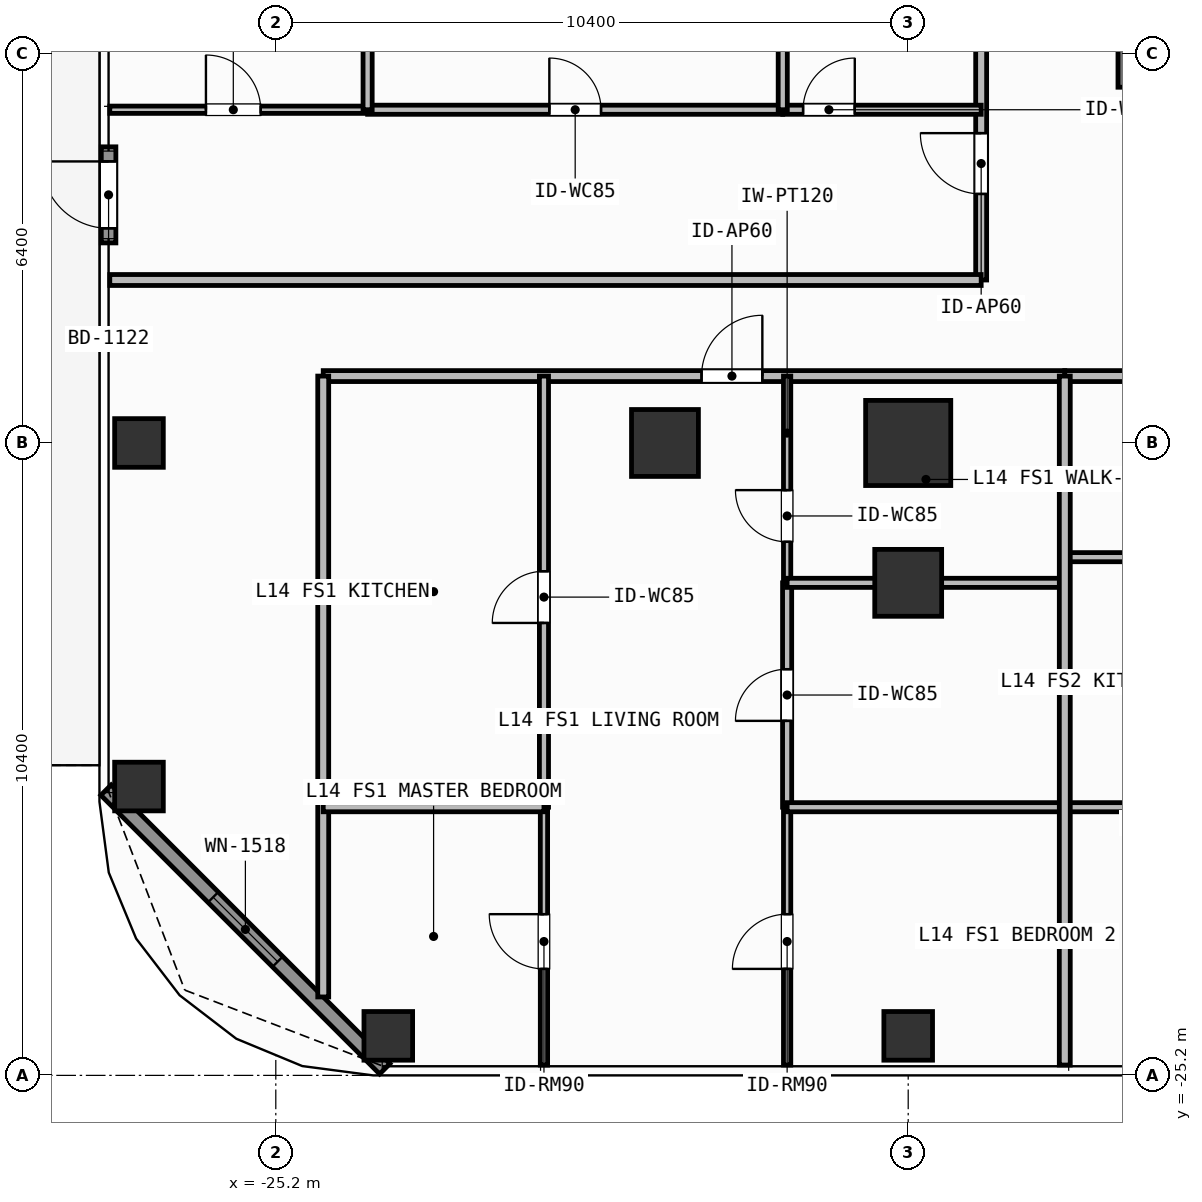
"""IFC4 building model, lengths in metres.
Left out: names, types, materials, properties, quantities, classifications, styles, units other than length and angle.
Written with IfcOpenShell. Run it as: python <this file> out.ifc"""

import sys

from ifc_helpers import new_model, si_unit, direction, frame, frame_2d, origin, origin_2d, place, context, subcontext, project, spatial, rectangle, hollow_rectangle, extrude, element, fill, save


model = new_model("IFC4")
c1 = context("Model", 3, precision=1e-05, world=origin(), true_north=direction((0.0, 1.0)))
c2 = subcontext(c1, "Body", "Model", "MODEL_VIEW")
j1 = project(units=[si_unit("LENGTHUNIT", "METRE"), si_unit("PLANEANGLEUNIT", "RADIAN")], contexts=[c1])
p1 = place(None, origin())
s1 = spatial("IfcSite", under=j1, at=p1, CompositionType="ELEMENT")
p2 = place(p1, origin())
s2 = spatial("IfcBuilding", under=s1, at=p2, CompositionType="ELEMENT")
p3 = place(p2, frame((0.0, 0.0, 54.0)))
s3 = spatial("IfcBuildingStorey", under=s2, at=p3, CompositionType="ELEMENT", Elevation=54.0)
p4 = place(p3, frame((-11.35, -8.4, 0.0), z_axis=(0.0, 0.0, 1.0), x_axis=(1.0, 0.0, 0.0)))
e1 = element("IfcWall", 1, at=p4, inside=s3, PredefinedType="SHEAR", context=c2, shape_type="SweptSolid", body=[
    extrude(rectangle(XDim=1.65, YDim=1.1, at=frame_2d((0.825, 0.0))), origin(), (0.0, 0.0, 1.0), 3.9),
])
p5 = place(p3, frame((-14.8, -14.8, 0.0), z_axis=(0.0, 0.0, 1.0), x_axis=(1.0, 0.0, 0.0)))
e2 = element("IfcColumn", 2, at=p5, inside=s3, PredefinedType="COLUMN", context=c2, shape_type="SweptSolid", body=[
    extrude(rectangle(XDim=1.4, YDim=1.4, at=origin_2d()), origin(), (0.0, 0.0, 1.0), 3.9),
])
for number, where, z_axis, x_axis in (
    (3, (-18.8, -14.8, 0.0), (0.0, 0.0, 1.0), (1.0, 0.0, 0.0)),
    (4, (-14.8, -17.1, 0.0), (0.0, 0.0, 1.0), (1.0, 0.0, 0.0)),
):
    element("IfcColumn", number, at=place(p3, frame(where, z_axis=z_axis, x_axis=x_axis)), inside=s3, PredefinedType="COLUMN", context=c2, shape_type="SweptSolid", body=[
        extrude(rectangle(XDim=1.1, YDim=1.1, at=origin_2d()), origin(), (0.0, 0.0, 1.0), 3.9),
    ])
for number, where, z_axis, x_axis in (
    (5, (-23.35, -24.55, 0.0), (0.0, 0.0, 1.0), (1.0, 0.0, 0.0)),
    (6, (-27.45, -20.45, 0.0), (0.0, 0.0, 1.0), (1.0, 0.0, 0.0)),
    (7, (-14.8, -24.55, 0.0), (0.0, 0.0, 1.0), (1.0, 0.0, 0.0)),
    (8, (-27.45, -14.8, 0.0), (0.0, 0.0, 1.0), (1.0, 0.0, 0.0)),
):
    element("IfcColumn", number, at=place(p3, frame(where, z_axis=z_axis, x_axis=x_axis)), inside=s3, PredefinedType="COLUMN", context=c2, shape_type="SweptSolid", body=[
        extrude(hollow_rectangle(XDim=0.8, YDim=0.8, WallThickness=0.036, at=origin_2d()), origin(), (0.0, 0.0, 1.0), 3.9),
    ])
p6 = place(p3, frame((-27.95, -11.51, 0.0), z_axis=(0.0, 0.0, 1.0), x_axis=(0.0, 1.0, 0.0)))
e9 = element("IfcWall", 9, at=p6, inside=s3, PredefinedType="SOLIDWALL", context=c2, shape_type="SweptSolid", body=[
    extrude(rectangle(XDim=1.58, YDim=0.24, at=frame_2d((0.79, 0.0))), origin(), (0.0, 0.0, 1.0), 3.68),
])
p7 = place(p6, frame((0.24, 0.0, 0.0)))
e10 = element("IfcOpeningElement", 10, at=p7, cuts=e9, PredefinedType="OPENING", context=c2, shape_type="SweptSolid", body=[
    extrude(rectangle(XDim=1.1, YDim=2.2, at=frame_2d((0.55, 1.1))), frame((0.0, 0.13, 0.0), z_axis=(0.0, -1.0, 0.0), x_axis=(1.0, 0.0, 0.0)), (0.0, 0.0, 1.0), 0.26),
])
p8 = place(p3, frame((-23.408, -25.092, 0.0), z_axis=(0.0, 0.0, 1.0), x_axis=(-0.707106781187, 0.707106781187, 0.0)))
e11 = element("IfcWall", 11, at=p8, inside=s3, PredefinedType="SOLIDWALL", context=c2, shape_type="SweptSolid", body=[
    extrude(rectangle(XDim=6.484, YDim=0.24, at=frame_2d((3.242, 0.0))), origin(), (0.0, 0.0, 1.0), 3.68),
])
p9 = place(p8, frame((2.492, 0.0, 0.8)))
e12 = element("IfcOpeningElement", 12, at=p9, cuts=e11, PredefinedType="OPENING", context=c2, shape_type="SweptSolid", body=[
    extrude(rectangle(XDim=1.5, YDim=1.85, at=frame_2d((0.75, 0.925))), frame((0.0, 0.13, 0.0), z_axis=(0.0, -1.0, 0.0), x_axis=(1.0, 0.0, 0.0)), (0.0, 0.0, 1.0), 0.26),
])
p10 = place(p3, frame((-24.42, -13.7, 0.0), z_axis=(0.0, 0.0, 1.0), x_axis=(1.0, 0.0, 0.0)))
e13 = element("IfcWall", 13, at=p10, inside=s3, PredefinedType="PARTITIONING", context=c2, shape_type="SweptSolid", body=[
    extrude(rectangle(XDim=12.195, YDim=0.18, at=frame_2d((6.097, 0.0))), origin(), (0.0, 0.0, 1.0), 3.68),
])
p11 = place(p10, frame((6.221, 0.0, 0.0)))
e14 = element("IfcOpeningElement", 14, at=p11, cuts=e13, PredefinedType="OPENING", context=c2, shape_type="SweptSolid", body=[
    extrude(rectangle(XDim=1.0, YDim=2.2, at=frame_2d((0.5, 1.1))), frame((0.0, 0.1, 0.0), z_axis=(0.0, -1.0, 0.0), x_axis=(1.0, 0.0, 0.0)), (0.0, 0.0, 1.0), 0.2),
])
p12 = place(p3, frame((-20.79, -20.79, 0.0), z_axis=(0.0, 0.0, 1.0), x_axis=(0.0, 1.0, 0.0)))
e15 = element("IfcWall", 15, at=p12, inside=s3, PredefinedType="PARTITIONING", context=c2, shape_type="SweptSolid", body=[
    extrude(rectangle(XDim=7.09, YDim=0.15, at=frame_2d((3.545, 0.0))), origin(), (0.0, 0.0, 1.0), 3.68),
])
p13 = place(p12, frame((3.03, 0.0, 0.0)))
e16 = element("IfcOpeningElement", 16, at=p13, cuts=e15, PredefinedType="OPENING", context=c2, shape_type="SweptSolid", body=[
    extrude(rectangle(XDim=0.85, YDim=2.1, at=frame_2d((0.425, 1.05))), frame((0.0, 0.085, 0.0), z_axis=(0.0, -1.0, 0.0), x_axis=(1.0, 0.0, 0.0)), (0.0, 0.0, 1.0), 0.17),
])
p14 = place(p3, frame((-20.79, -25.03, 0.0), z_axis=(0.0, 0.0, 1.0), x_axis=(0.0, 1.0, 0.0)))
e17 = element("IfcWall", 17, at=p14, inside=s3, PredefinedType="PARTITIONING", context=c2, shape_type="SweptSolid", body=[
    extrude(rectangle(XDim=4.24, YDim=0.12, at=frame_2d((2.12, 0.0))), origin(), (0.0, 0.0, 1.0), 3.68),
])
p15 = place(p14, frame((1.581, 0.0, 0.0)))
e18 = element("IfcOpeningElement", 18, at=p15, cuts=e17, PredefinedType="OPENING", context=c2, shape_type="SweptSolid", body=[
    extrude(rectangle(XDim=0.9, YDim=2.1, at=frame_2d((0.45, 1.05))), frame((0.0, 0.07, 0.0), z_axis=(0.0, -1.0, 0.0), x_axis=(1.0, 0.0, 0.0)), (0.0, 0.0, 1.0), 0.14),
])
p16 = place(p3, frame((-16.791, -20.79, 0.0), z_axis=(0.0, 0.0, 1.0), x_axis=(0.0, 1.0, 0.0)))
e19 = element("IfcWall", 19, at=p16, inside=s3, PredefinedType="PARTITIONING", context=c2, shape_type="SweptSolid", body=[
    extrude(rectangle(XDim=3.69, YDim=0.15, at=frame_2d((1.845, 0.0))), origin(), (0.0, 0.0, 1.0), 3.68),
])
p17 = place(p16, frame((1.42, 0.0, 0.0)))
e20 = element("IfcOpeningElement", 20, at=p17, cuts=e19, PredefinedType="OPENING", context=c2, shape_type="SweptSolid", body=[
    extrude(rectangle(XDim=0.85, YDim=2.1, at=frame_2d((0.425, 1.05))), frame((0.0, 0.085, 0.0), z_axis=(0.0, -1.0, 0.0), x_axis=(1.0, 0.0, 0.0)), (0.0, 0.0, 1.0), 0.17),
])
p18 = place(p3, frame((-16.791, -17.1, 0.0), z_axis=(0.0, 0.0, 1.0), x_axis=(0.0, 1.0, 0.0)))
e21 = element("IfcWall", 21, at=p18, inside=s3, PredefinedType="PARTITIONING", context=c2, shape_type="SweptSolid", body=[
    extrude(rectangle(XDim=3.4, YDim=0.12, at=frame_2d((1.7, 0.0))), origin(), (0.0, 0.0, 1.0), 3.68),
])
p19 = place(p18, frame((0.675, 0.0, 0.0)))
e22 = element("IfcOpeningElement", 22, at=p19, cuts=e21, PredefinedType="OPENING", context=c2, shape_type="SweptSolid", body=[
    extrude(rectangle(XDim=0.85, YDim=2.1, at=frame_2d((0.425, 1.05))), frame((0.0, 0.07, 0.0), z_axis=(0.0, -1.0, 0.0), x_axis=(1.0, 0.0, 0.0)), (0.0, 0.0, 1.0), 0.14),
])
p20 = place(p3, frame((-16.791, -25.03, 0.0), z_axis=(0.0, 0.0, 1.0), x_axis=(0.0, 1.0, 0.0)))
e23 = element("IfcWall", 23, at=p20, inside=s3, PredefinedType="PARTITIONING", context=c2, shape_type="SweptSolid", body=[
    extrude(rectangle(XDim=4.24, YDim=0.12, at=frame_2d((2.12, 0.0))), origin(), (0.0, 0.0, 1.0), 3.68),
])
p21 = place(p20, frame((1.581, 0.0, 0.0)))
e24 = element("IfcOpeningElement", 24, at=p21, cuts=e23, PredefinedType="OPENING", context=c2, shape_type="SweptSolid", body=[
    extrude(rectangle(XDim=0.9, YDim=2.1, at=frame_2d((0.45, 1.05))), frame((0.0, 0.07, 0.0), z_axis=(0.0, -1.0, 0.0), x_axis=(1.0, 0.0, 0.0)), (0.0, 0.0, 1.0), 0.14),
])
p22 = place(p3, frame((-12.225, -13.7, 0.0), z_axis=(0.0, 0.0, 1.0), x_axis=(1.0, 0.0, 0.0)))
e25 = element("IfcWall", 25, at=p22, inside=s3, PredefinedType="PARTITIONING", context=c2, shape_type="SweptSolid", body=[
    extrude(rectangle(XDim=17.467, YDim=0.18, at=frame_2d((8.733, 0.0))), origin(), (0.0, 0.0, 1.0), 3.68),
])
p23 = place(p22, frame((9.848, 0.0, 0.0)))
e26 = element("IfcOpeningElement", 26, at=p23, cuts=e25, PredefinedType="OPENING", context=c2, shape_type="SweptSolid", body=[
    extrude(rectangle(XDim=1.0, YDim=2.2, at=frame_2d((0.5, 1.1))), frame((0.0, 0.1, 0.0), z_axis=(0.0, -1.0, 0.0), x_axis=(1.0, 0.0, 0.0)), (0.0, 0.0, 1.0), 0.2),
])
p24 = place(p3, frame((-13.6, -12.12, 0.0), z_axis=(0.0, 0.0, 1.0), x_axis=(0.0, 1.0, 0.0)))
e27 = element("IfcWall", 27, at=p24, inside=s3, PredefinedType="PARTITIONING", context=c2, shape_type="SweptSolid", body=[
    extrude(rectangle(XDim=9.389, YDim=0.18, at=frame_2d((4.695, 0.0))), origin(), (0.0, 0.0, 1.0), 3.68),
])
p25 = place(p24, frame((1.415, 0.0, 0.0)))
e28 = element("IfcOpeningElement", 28, at=p25, cuts=e27, PredefinedType="OPENING", context=c2, shape_type="SweptSolid", body=[
    extrude(rectangle(XDim=1.0, YDim=2.2, at=frame_2d((0.5, 1.1))), frame((0.0, 0.1, 0.0), z_axis=(0.0, -1.0, 0.0), x_axis=(1.0, 0.0, 0.0)), (0.0, 0.0, 1.0), 0.2),
])
p26 = place(p3, frame((-23.69, -9.32, 0.0), z_axis=(0.0, 0.0, 1.0), x_axis=(1.0, 0.0, 0.0)))
e29 = element("IfcWall", 29, at=p26, inside=s3, PredefinedType="PARTITIONING", context=c2, shape_type="SweptSolid", body=[
    extrude(rectangle(XDim=6.827, YDim=0.15, at=frame_2d((3.414, 0.0))), origin(), (0.0, 0.0, 1.0), 3.68),
])
p27 = place(p26, frame((2.989, 0.0, 0.0)))
e30 = element("IfcOpeningElement", 30, at=p27, cuts=e29, PredefinedType="OPENING", context=c2, shape_type="SweptSolid", body=[
    extrude(rectangle(XDim=0.85, YDim=2.1, at=frame_2d((0.425, 1.05))), frame((0.0, 0.085, 0.0), z_axis=(0.0, -1.0, 0.0), x_axis=(1.0, 0.0, 0.0)), (0.0, 0.0, 1.0), 0.17),
])
p28 = place(p3, frame((-16.863, -9.32, 0.0), z_axis=(0.0, 0.0, 1.0), x_axis=(1.0, 0.0, 0.0)))
e31 = element("IfcWall", 31, at=p28, inside=s3, PredefinedType="PARTITIONING", context=c2, shape_type="SweptSolid", body=[
    extrude(rectangle(XDim=3.263, YDim=0.15, at=frame_2d((1.631, 0.0))), origin(), (0.0, 0.0, 1.0), 3.68),
])
p29 = place(p28, frame((0.334, 0.0, 0.0)))
e32 = element("IfcOpeningElement", 32, at=p29, cuts=e31, PredefinedType="OPENING", context=c2, shape_type="SweptSolid", body=[
    extrude(rectangle(XDim=0.85, YDim=2.1, at=frame_2d((0.425, 1.05))), frame((0.0, 0.085, 0.0), z_axis=(0.0, -1.0, 0.0), x_axis=(1.0, 0.0, 0.0)), (0.0, 0.0, 1.0), 0.17),
])
p30 = place(p3, frame((-27.93, -9.32, 0.0), z_axis=(0.0, 0.0, 1.0), x_axis=(1.0, 0.0, 0.0)))
e33 = element("IfcWall", 33, at=p30, inside=s3, PredefinedType="PARTITIONING", context=c2, shape_type="SweptSolid", body=[
    extrude(rectangle(XDim=4.24, YDim=0.12, at=frame_2d((2.12, 0.0))), origin(), (0.0, 0.0, 1.0), 3.68),
])
p31 = place(p30, frame((1.581, 0.0, 0.0)))
e34 = element("IfcOpeningElement", 34, at=p31, cuts=e33, PredefinedType="OPENING", context=c2, shape_type="SweptSolid", body=[
    extrude(rectangle(XDim=0.9, YDim=2.1, at=frame_2d((0.45, 1.05))), frame((0.0, 0.07, 0.0), z_axis=(0.0, -1.0, 0.0), x_axis=(1.0, 0.0, 0.0)), (0.0, 0.0, 1.0), 0.14),
])
p32 = place(p3, frame((-24.42, -23.91, 0.0), z_axis=(0.0, 0.0, 1.0), x_axis=(0.0, 1.0, 0.0)))
e35 = element("IfcWall", 35, at=p32, inside=s3, PredefinedType="PARTITIONING", context=c2, shape_type="SweptSolid", body=[
    extrude(rectangle(XDim=10.21, YDim=0.18, at=frame_2d((5.105, 0.0))), origin(), (0.0, 0.0, 1.0), 3.68),
])
p33 = place(p3, frame((-24.42, -20.79, 0.0), z_axis=(0.0, 0.0, 1.0), x_axis=(1.0, 0.0, 0.0)))
e36 = element("IfcWall", 36, at=p33, inside=s3, PredefinedType="PARTITIONING", context=c2, shape_type="SweptSolid", body=[
    extrude(rectangle(XDim=3.63, YDim=0.15, at=frame_2d((1.815, 0.0))), origin(), (0.0, 0.0, 1.0), 3.68),
])
p34 = place(p3, frame((-16.791, -17.1, 0.0), z_axis=(0.0, 0.0, 1.0), x_axis=(1.0, 0.0, 0.0)))
e37 = element("IfcWall", 37, at=p34, inside=s3, PredefinedType="PARTITIONING", context=c2, shape_type="SweptSolid", body=[
    extrude(rectangle(XDim=4.566, YDim=0.15, at=frame_2d((2.283, 0.0))), origin(), (0.0, 0.0, 1.0), 3.082),
])
p35 = place(p3, frame((-16.791, -20.79, 0.0), z_axis=(0.0, 0.0, 1.0), x_axis=(1.0, 0.0, 0.0)))
e38 = element("IfcWall", 38, at=p35, inside=s3, PredefinedType="PARTITIONING", context=c2, shape_type="SweptSolid", body=[
    extrude(rectangle(XDim=4.566, YDim=0.15, at=frame_2d((2.283, 0.0))), origin(), (0.0, 0.0, 1.0), 3.68),
])
p36 = place(p3, frame((-12.225, -16.678, 0.0), z_axis=(0.0, 0.0, 1.0), x_axis=(1.0, 0.0, 0.0)))
e39 = element("IfcWall", 39, at=p36, inside=s3, PredefinedType="PARTITIONING", context=c2, shape_type="SweptSolid", body=[
    extrude(rectangle(XDim=6.748, YDim=0.15, at=frame_2d((3.374, 0.0))), origin(), (0.0, 0.0, 1.0), 3.68),
])
p37 = place(p36, frame((2.859, 0.0, 0.0)))
e40 = element("IfcOpeningElement", 40, at=p37, cuts=e39, PredefinedType="OPENING", context=c2, shape_type="SweptSolid", body=[
    extrude(rectangle(XDim=0.85, YDim=2.1, at=frame_2d((0.425, 1.05))), frame((0.0, 0.085, 0.0), z_axis=(0.0, -1.0, 0.0), x_axis=(1.0, 0.0, 0.0)), (0.0, 0.0, 1.0), 0.17),
])
p38 = place(p3, frame((-12.225, -20.79, 0.0), z_axis=(0.0, 0.0, 1.0), x_axis=(1.0, 0.0, 0.0)))
e41 = element("IfcWall", 41, at=p38, inside=s3, PredefinedType="PARTITIONING", context=c2, shape_type="SweptSolid", body=[
    extrude(rectangle(XDim=6.748, YDim=0.15, at=frame_2d((3.374, 0.0))), origin(), (0.0, 0.0, 1.0), 3.68),
])
p39 = place(p3, frame((-12.225, -25.03, 0.0), z_axis=(0.0, 0.0, 1.0), x_axis=(0.0, 1.0, 0.0)))
e42 = element("IfcWall", 42, at=p39, inside=s3, PredefinedType="PARTITIONING", context=c2, shape_type="SweptSolid", body=[
    extrude(rectangle(XDim=11.33, YDim=0.18, at=frame_2d((5.665, 0.0))), origin(), (0.0, 0.0, 1.0), 3.68),
])
for number, where, z_axis, x_axis in (
    (43, (-16.863, -9.32, 0.0), (0.0, 0.0, 1.0), (0.0, 1.0, 0.0)),
    (44, (-23.69, -9.32, 0.0), (0.0, 0.0, 1.0), (0.0, 1.0, 0.0)),
):
    element("IfcWall", number, at=place(p3, frame(where, z_axis=z_axis, x_axis=x_axis)), inside=s3, PredefinedType="PARTITIONING", context=c2, shape_type="SweptSolid", body=[
        extrude(rectangle(XDim=6.589, YDim=0.15, at=frame_2d((3.294, 0.0))), origin(), (0.0, 0.0, 1.0), 3.68),
    ])
p40 = place(p3, frame((-27.93, -12.12, 0.0), z_axis=(0.0, 0.0, 1.0), x_axis=(1.0, 0.0, 0.0)))
e45 = element("IfcWall", 45, at=p40, inside=s3, PredefinedType="PARTITIONING", context=c2, shape_type="SweptSolid", body=[
    extrude(rectangle(XDim=14.33, YDim=0.18, at=frame_2d((7.165, 0.0))), origin(), (0.0, 0.0, 1.0), 3.68),
])
p41 = place(p7, origin())
e46 = element("IfcDoor", 46, at=p41, inside=s3, OperationType="SINGLE_SWING_RIGHT", PredefinedType="DOOR", context=c2, shape_type="SweptSolid", body=[
    extrude(rectangle(XDim=1.1, YDim=2.2, at=frame_2d((0.55, 1.1))), frame((0.0, 0.025, 0.0), z_axis=(0.0, -1.0, 0.0), x_axis=(1.0, 0.0, 0.0)), (0.0, 0.0, 1.0), 0.05),
])
fill(e10, e46)
p42 = place(p9, origin())
e47 = element("IfcWindow", 47, at=p42, inside=s3, PartitioningType="SINGLE_PANEL", PredefinedType="WINDOW", context=c2, shape_type="SweptSolid", body=[
    extrude(rectangle(XDim=1.5, YDim=1.85, at=frame_2d((0.75, 0.925))), frame((0.0, 0.03, 0.0), z_axis=(0.0, -1.0, 0.0), x_axis=(1.0, 0.0, 0.0)), (0.0, 0.0, 1.0), 0.06),
])
fill(e12, e47)
p43 = place(p11, origin())
e48 = element("IfcDoor", 48, at=p43, inside=s3, OperationType="SINGLE_SWING_RIGHT", PredefinedType="DOOR", context=c2, shape_type="SweptSolid", body=[
    extrude(rectangle(XDim=1.0, YDim=2.2, at=frame_2d((0.5, 1.1))), frame((0.0, 0.025, 0.0), z_axis=(0.0, -1.0, 0.0), x_axis=(1.0, 0.0, 0.0)), (0.0, 0.0, 1.0), 0.05),
])
fill(e14, e48)
p44 = place(p13, origin())
e49 = element("IfcDoor", 49, at=p44, inside=s3, OperationType="SINGLE_SWING_LEFT", PredefinedType="DOOR", context=c2, shape_type="SweptSolid", body=[
    extrude(rectangle(XDim=0.85, YDim=2.1, at=frame_2d((0.425, 1.05))), frame((0.0, 0.025, 0.0), z_axis=(0.0, -1.0, 0.0), x_axis=(1.0, 0.0, 0.0)), (0.0, 0.0, 1.0), 0.05),
])
fill(e16, e49)
p45 = place(p15, origin())
e50 = element("IfcDoor", 50, at=p45, inside=s3, OperationType="SINGLE_SWING_RIGHT", PredefinedType="DOOR", context=c2, shape_type="SweptSolid", body=[
    extrude(rectangle(XDim=0.9, YDim=2.1, at=frame_2d((0.45, 1.05))), frame((0.0, 0.025, 0.0), z_axis=(0.0, -1.0, 0.0), x_axis=(1.0, 0.0, 0.0)), (0.0, 0.0, 1.0), 0.05),
])
fill(e18, e50)
p46 = place(p17, origin())
e51 = element("IfcDoor", 51, at=p46, inside=s3, OperationType="SINGLE_SWING_LEFT", PredefinedType="DOOR", context=c2, shape_type="SweptSolid", body=[
    extrude(rectangle(XDim=0.85, YDim=2.1, at=frame_2d((0.425, 1.05))), frame((0.0, 0.025, 0.0), z_axis=(0.0, -1.0, 0.0), x_axis=(1.0, 0.0, 0.0)), (0.0, 0.0, 1.0), 0.05),
])
fill(e20, e51)
p47 = place(p19, origin())
e52 = element("IfcDoor", 52, at=p47, inside=s3, OperationType="SINGLE_SWING_RIGHT", PredefinedType="DOOR", context=c2, shape_type="SweptSolid", body=[
    extrude(rectangle(XDim=0.85, YDim=2.1, at=frame_2d((0.425, 1.05))), frame((0.0, 0.025, 0.0), z_axis=(0.0, -1.0, 0.0), x_axis=(1.0, 0.0, 0.0)), (0.0, 0.0, 1.0), 0.05),
])
fill(e22, e52)
p48 = place(p21, origin())
e53 = element("IfcDoor", 53, at=p48, inside=s3, OperationType="SINGLE_SWING_LEFT", PredefinedType="DOOR", context=c2, shape_type="SweptSolid", body=[
    extrude(rectangle(XDim=0.9, YDim=2.1, at=frame_2d((0.45, 1.05))), frame((0.0, 0.025, 0.0), z_axis=(0.0, -1.0, 0.0), x_axis=(1.0, 0.0, 0.0)), (0.0, 0.0, 1.0), 0.05),
])
fill(e24, e53)
p49 = place(p25, origin())
e54 = element("IfcDoor", 54, at=p49, inside=s3, OperationType="SINGLE_SWING_RIGHT", PredefinedType="DOOR", context=c2, shape_type="SweptSolid", body=[
    extrude(rectangle(XDim=1.0, YDim=2.2, at=frame_2d((0.5, 1.1))), frame((0.0, 0.025, 0.0), z_axis=(0.0, -1.0, 0.0), x_axis=(1.0, 0.0, 0.0)), (0.0, 0.0, 1.0), 0.05),
])
fill(e28, e54)
p50 = place(p27, origin())
e55 = element("IfcDoor", 55, at=p50, inside=s3, OperationType="SINGLE_SWING_LEFT", PredefinedType="DOOR", context=c2, shape_type="SweptSolid", body=[
    extrude(rectangle(XDim=0.85, YDim=2.1, at=frame_2d((0.425, 1.05))), frame((0.0, 0.025, 0.0), z_axis=(0.0, -1.0, 0.0), x_axis=(1.0, 0.0, 0.0)), (0.0, 0.0, 1.0), 0.05),
])
fill(e30, e55)
p51 = place(p29, origin())
e56 = element("IfcDoor", 56, at=p51, inside=s3, OperationType="SINGLE_SWING_RIGHT", PredefinedType="DOOR", context=c2, shape_type="SweptSolid", body=[
    extrude(rectangle(XDim=0.85, YDim=2.1, at=frame_2d((0.425, 1.05))), frame((0.0, 0.025, 0.0), z_axis=(0.0, -1.0, 0.0), x_axis=(1.0, 0.0, 0.0)), (0.0, 0.0, 1.0), 0.05),
])
fill(e32, e56)
p52 = place(p31, origin())
e57 = element("IfcDoor", 57, at=p52, inside=s3, OperationType="SINGLE_SWING_LEFT", PredefinedType="DOOR", context=c2, shape_type="SweptSolid", body=[
    extrude(rectangle(XDim=0.9, YDim=2.1, at=frame_2d((0.45, 1.05))), frame((0.0, 0.025, 0.0), z_axis=(0.0, -1.0, 0.0), x_axis=(1.0, 0.0, 0.0)), (0.0, 0.0, 1.0), 0.05),
])
fill(e34, e57)
save(model, sys.argv[1])
